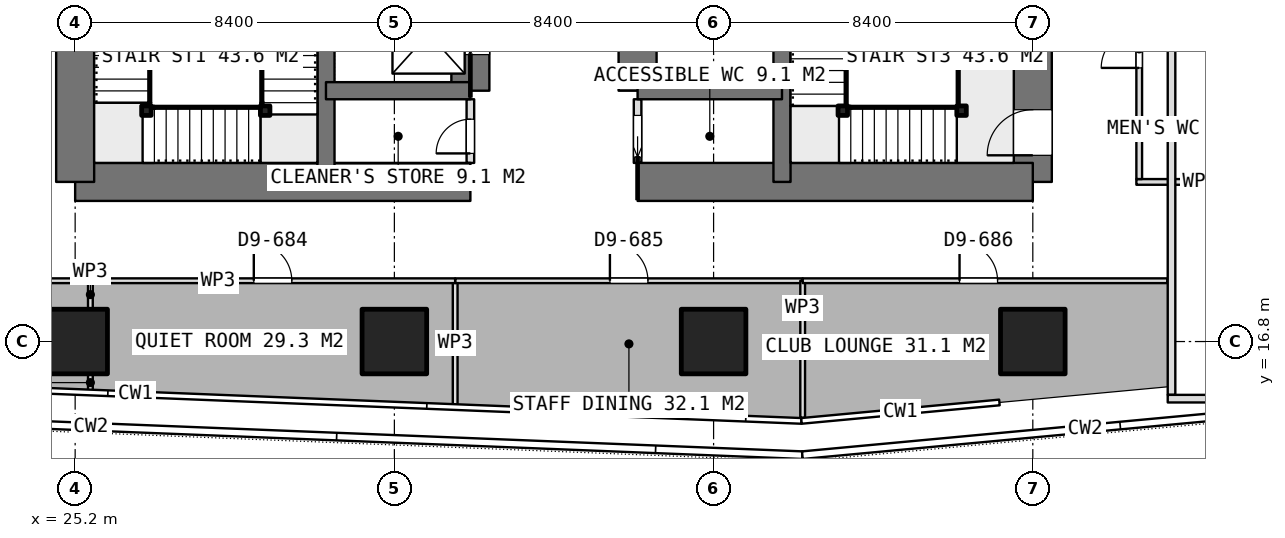
"""IFC4 building model, lengths in metres.
Left out: names, types, materials, properties, quantities, classifications, styles, units other than length and angle.
Written with IfcOpenShell. Run it as: python <this file> out.ifc"""

import sys

from ifc_helpers import new_model, si_unit, direction, frame, frame_2d, origin, origin_2d, place, context, subcontext, project, spatial, rectangle, extrude, element, fill, save


model = new_model("IFC4")
c1 = context("Model", 3, precision=1e-05, world=origin(), true_north=direction((0.0, 1.0)))
c2 = subcontext(c1, "Body", "Model", "MODEL_VIEW")
j1 = project(units=[si_unit("LENGTHUNIT", "METRE"), si_unit("PLANEANGLEUNIT", "RADIAN")], contexts=[c1])
p1 = place(None, origin())
s1 = spatial("IfcSite", under=j1, at=p1, CompositionType="ELEMENT")
p2 = place(p1, origin())
s2 = spatial("IfcBuilding", under=s1, at=p2, CompositionType="ELEMENT")
p3 = place(p2, frame((0.0, 0.0, 176.45)))
s3 = spatial("IfcBuildingStorey", under=s2, at=p3, CompositionType="ELEMENT", Elevation=176.45)
p4 = place(p3, frame((25.2, 21.0, 0.0), z_axis=(0.0, 0.0, 1.0), x_axis=(1.0, 0.0, 0.0)))
e1 = element("IfcWall", 1, at=p4, inside=s3, PredefinedType="SHEAR", context=c2, shape_type="SweptSolid", body=[
    extrude(rectangle(XDim=10.4, YDim=1.0, at=frame_2d((5.2, 0.0))), origin(), (0.0, 0.0, 1.0), 3.75),
])
p5 = place(p3, frame((40.0, 21.0, 0.0), z_axis=(0.0, 0.0, 1.0), x_axis=(1.0, 0.0, 0.0)))
e2 = element("IfcWall", 2, at=p5, inside=s3, PredefinedType="SHEAR", context=c2, shape_type="SweptSolid", body=[
    extrude(rectangle(XDim=10.4, YDim=1.0, at=frame_2d((5.2, 0.0))), origin(), (0.0, 0.0, 1.0), 3.75),
])
p6 = place(p3, frame((25.2, 21.0, 0.0), z_axis=(0.0, 0.0, 1.0), x_axis=(0.0, 1.0, 0.0)))
e3 = element("IfcWall", 3, at=p6, inside=s3, PredefinedType="SHEAR", context=c2, shape_type="SweptSolid", body=[
    extrude(rectangle(XDim=25.2, YDim=1.0, at=frame_2d((12.6, 0.0))), origin(), (0.0, 0.0, 1.0), 3.75),
])
p7 = place(p6, frame((7.8, 0.0, 0.0)))
e4 = element("IfcOpeningElement", 4, at=p7, cuts=e3, PredefinedType="OPENING", context=c2, shape_type="SweptSolid", body=[
    extrude(rectangle(XDim=1.2, YDim=2.1, at=frame_2d((0.6, 1.05))), frame((0.0, 0.51, 0.0), z_axis=(0.0, -1.0, 0.0), x_axis=(1.0, 0.0, 0.0)), (0.0, 0.0, 1.0), 1.02),
])
p8 = place(p6, frame((14.25, 0.0, 0.0)))
e5 = element("IfcOpeningElement", 5, at=p8, cuts=e3, PredefinedType="OPENING", context=c2, shape_type="SweptSolid", body=[
    extrude(rectangle(XDim=0.9, YDim=2.1, at=frame_2d((0.45, 1.05))), frame((0.0, 0.51, 0.0), z_axis=(0.0, -1.0, 0.0), x_axis=(1.0, 0.0, 0.0)), (0.0, 0.0, 1.0), 1.02),
])
p9 = place(p6, frame((16.85, 0.0, 0.0)))
e6 = element("IfcOpeningElement", 6, at=p9, cuts=e3, PredefinedType="OPENING", context=c2, shape_type="SweptSolid", body=[
    extrude(rectangle(XDim=0.9, YDim=2.1, at=frame_2d((0.45, 1.05))), frame((0.0, 0.51, 0.0), z_axis=(0.0, -1.0, 0.0), x_axis=(1.0, 0.0, 0.0)), (0.0, 0.0, 1.0), 1.02),
])
p10 = place(p6, frame((19.025, 0.0, 0.0)))
e7 = element("IfcOpeningElement", 7, at=p10, cuts=e3, PredefinedType="OPENING", context=c2, shape_type="SweptSolid", body=[
    extrude(rectangle(XDim=1.2, YDim=2.1, at=frame_2d((0.6, 1.05))), frame((0.0, 0.51, 0.0), z_axis=(0.0, -1.0, 0.0), x_axis=(1.0, 0.0, 0.0)), (0.0, 0.0, 1.0), 1.02),
])
p11 = place(p3, frame((50.4, 21.0, 0.0), z_axis=(0.0, 0.0, 1.0), x_axis=(0.0, 1.0, 0.0)))
e8 = element("IfcWall", 8, at=p11, inside=s3, PredefinedType="SHEAR", context=c2, shape_type="SweptSolid", body=[
    extrude(rectangle(XDim=25.2, YDim=1.0, at=frame_2d((12.6, 0.0))), origin(), (0.0, 0.0, 1.0), 3.75),
])
p12 = place(p11, frame((16.2, 0.0, 0.0)))
e9 = element("IfcOpeningElement", 9, at=p12, cuts=e8, PredefinedType="OPENING", context=c2, shape_type="SweptSolid", body=[
    extrude(rectangle(XDim=1.2, YDim=2.1, at=frame_2d((0.6, 1.05))), frame((0.0, 0.51, 0.0), z_axis=(0.0, -1.0, 0.0), x_axis=(1.0, 0.0, 0.0)), (0.0, 0.0, 1.0), 1.02),
])
p13 = place(p11, frame((10.05, 0.0, 0.0)))
e10 = element("IfcOpeningElement", 10, at=p13, cuts=e8, PredefinedType="OPENING", context=c2, shape_type="SweptSolid", body=[
    extrude(rectangle(XDim=0.9, YDim=2.1, at=frame_2d((0.45, 1.05))), frame((0.0, 0.51, 0.0), z_axis=(0.0, -1.0, 0.0), x_axis=(1.0, 0.0, 0.0)), (0.0, 0.0, 1.0), 1.02),
])
p14 = place(p11, frame((7.45, 0.0, 0.0)))
e11 = element("IfcOpeningElement", 11, at=p14, cuts=e8, PredefinedType="OPENING", context=c2, shape_type="SweptSolid", body=[
    extrude(rectangle(XDim=0.9, YDim=2.1, at=frame_2d((0.45, 1.05))), frame((0.0, 0.51, 0.0), z_axis=(0.0, -1.0, 0.0), x_axis=(1.0, 0.0, 0.0)), (0.0, 0.0, 1.0), 1.02),
])
p15 = place(p11, frame((0.7, 0.0, 0.0)))
e12 = element("IfcOpeningElement", 12, at=p15, cuts=e8, PredefinedType="OPENING", context=c2, shape_type="SweptSolid", body=[
    extrude(rectangle(XDim=1.2, YDim=2.1, at=frame_2d((0.6, 1.05))), frame((0.0, 0.51, 0.0), z_axis=(0.0, -1.0, 0.0), x_axis=(1.0, 0.0, 0.0)), (0.0, 0.0, 1.0), 1.02),
])
for number, where, z_axis, x_axis in (
    (13, (31.8, 21.0, 0.0), (0.0, 0.0, 1.0), (0.0, 1.0, 0.0)),
    (14, (43.8, 21.0, 0.0), (0.0, 0.0, 1.0), (0.0, 1.0, 0.0)),
):
    element("IfcWall", number, at=place(p3, frame(where, z_axis=z_axis, x_axis=x_axis)), inside=s3, PredefinedType="SHEAR", context=c2, shape_type="SweptSolid", body=[
        extrude(rectangle(XDim=25.2, YDim=0.45, at=frame_2d((12.6, 0.0))), origin(), (0.0, 0.0, 1.0), 3.75),
    ])
p16 = place(p3, frame((35.6, 23.4, 0.0), z_axis=(0.0, 0.0, 1.0), x_axis=(0.0, 1.0, 0.0)))
e15 = element("IfcWall", 15, at=p16, inside=s3, PredefinedType="SHEAR", context=c2, shape_type="SweptSolid", body=[
    extrude(rectangle(XDim=18.0, YDim=1.0, at=frame_2d((9.0, 0.0))), origin(), (0.0, 0.0, 1.0), 3.75),
])
p17 = place(p16, frame((0.95, 0.0, 0.0)))
e16 = element("IfcOpeningElement", 16, at=p17, cuts=e15, PredefinedType="OPENING", context=c2, shape_type="SweptSolid", body=[
    extrude(rectangle(XDim=1.1, YDim=2.1, at=frame_2d((0.55, 1.05))), frame((0.0, 0.51, 0.0), z_axis=(0.0, -1.0, 0.0), x_axis=(1.0, 0.0, 0.0)), (0.0, 0.0, 1.0), 1.02),
])
p18 = place(p16, frame((3.95, 0.0, 0.0)))
e17 = element("IfcOpeningElement", 17, at=p18, cuts=e15, PredefinedType="OPENING", context=c2, shape_type="SweptSolid", body=[
    extrude(rectangle(XDim=1.1, YDim=2.1, at=frame_2d((0.55, 1.05))), frame((0.0, 0.51, 0.0), z_axis=(0.0, -1.0, 0.0), x_axis=(1.0, 0.0, 0.0)), (0.0, 0.0, 1.0), 1.02),
])
p19 = place(p16, frame((6.95, 0.0, 0.0)))
e18 = element("IfcOpeningElement", 18, at=p19, cuts=e15, PredefinedType="OPENING", context=c2, shape_type="SweptSolid", body=[
    extrude(rectangle(XDim=1.1, YDim=2.1, at=frame_2d((0.55, 1.05))), frame((0.0, 0.51, 0.0), z_axis=(0.0, -1.0, 0.0), x_axis=(1.0, 0.0, 0.0)), (0.0, 0.0, 1.0), 1.02),
])
p20 = place(p16, frame((9.95, 0.0, 0.0)))
e19 = element("IfcOpeningElement", 19, at=p20, cuts=e15, PredefinedType="OPENING", context=c2, shape_type="SweptSolid", body=[
    extrude(rectangle(XDim=1.1, YDim=2.1, at=frame_2d((0.55, 1.05))), frame((0.0, 0.51, 0.0), z_axis=(0.0, -1.0, 0.0), x_axis=(1.0, 0.0, 0.0)), (0.0, 0.0, 1.0), 1.02),
])
p21 = place(p16, frame((12.95, 0.0, 0.0)))
e20 = element("IfcOpeningElement", 20, at=p21, cuts=e15, PredefinedType="OPENING", context=c2, shape_type="SweptSolid", body=[
    extrude(rectangle(XDim=1.1, YDim=2.1, at=frame_2d((0.55, 1.05))), frame((0.0, 0.51, 0.0), z_axis=(0.0, -1.0, 0.0), x_axis=(1.0, 0.0, 0.0)), (0.0, 0.0, 1.0), 1.02),
])
p22 = place(p16, frame((15.95, 0.0, 0.0)))
e21 = element("IfcOpeningElement", 21, at=p22, cuts=e15, PredefinedType="OPENING", context=c2, shape_type="SweptSolid", body=[
    extrude(rectangle(XDim=1.1, YDim=2.1, at=frame_2d((0.55, 1.05))), frame((0.0, 0.51, 0.0), z_axis=(0.0, -1.0, 0.0), x_axis=(1.0, 0.0, 0.0)), (0.0, 0.0, 1.0), 1.02),
])
p23 = place(p3, frame((40.0, 23.4, 0.0), z_axis=(0.0, 0.0, 1.0), x_axis=(0.0, 1.0, 0.0)))
e22 = element("IfcWall", 22, at=p23, inside=s3, PredefinedType="SHEAR", context=c2, shape_type="SweptSolid", body=[
    extrude(rectangle(XDim=18.0, YDim=1.0, at=frame_2d((9.0, 0.0))), origin(), (0.0, 0.0, 1.0), 3.75),
])
p24 = place(p23, frame((3.15, 0.0, 0.0)))
e23 = element("IfcOpeningElement", 23, at=p24, cuts=e22, PredefinedType="OPENING", context=c2, shape_type="SweptSolid", body=[
    extrude(rectangle(XDim=0.9, YDim=2.1, at=frame_2d((0.45, 1.05))), frame((0.0, 0.51, 0.0), z_axis=(0.0, -1.0, 0.0), x_axis=(1.0, 0.0, 0.0)), (0.0, 0.0, 1.0), 1.02),
])
p25 = place(p23, frame((9.1, 0.0, 0.0)))
e24 = element("IfcOpeningElement", 24, at=p25, cuts=e22, PredefinedType="OPENING", context=c2, shape_type="SweptSolid", body=[
    extrude(rectangle(XDim=1.0, YDim=2.1, at=frame_2d((0.5, 1.05))), frame((0.0, 0.51, 0.0), z_axis=(0.0, -1.0, 0.0), x_axis=(1.0, 0.0, 0.0)), (0.0, 0.0, 1.0), 1.02),
])
for number, where, z_axis, x_axis in (
    (25, (31.8, 23.4, 0.0), (0.0, 0.0, 1.0), (1.0, 0.0, 0.0)),
    (26, (40.0, 23.4, 0.0), (0.0, 0.0, 1.0), (1.0, 0.0, 0.0)),
):
    element("IfcWall", number, at=place(p3, frame(where, z_axis=z_axis, x_axis=x_axis)), inside=s3, PredefinedType="SHEAR", context=c2, shape_type="SweptSolid", body=[
        extrude(rectangle(XDim=3.8, YDim=0.45, at=frame_2d((1.9, 0.0))), origin(), (0.0, 0.0, 1.0), 3.75),
    ])
for number, where, z_axis, x_axis in (
    (27, (25.2, 16.8, 0.0), (0.0, 0.0, 1.0), (1.0, 0.0, 0.0)),
    (28, (33.6, 16.8, 0.0), (0.0, 0.0, 1.0), (1.0, 0.0, 0.0)),
    (29, (42.0, 16.8, 0.0), (0.0, 0.0, 1.0), (1.0, 0.0, 0.0)),
    (30, (50.4, 16.8, 0.0), (0.0, 0.0, 1.0), (1.0, 0.0, 0.0)),
):
    element("IfcColumn", number, at=place(p3, frame(where, z_axis=z_axis, x_axis=x_axis)), inside=s3, PredefinedType="COLUMN", context=c2, shape_type="SweptSolid", body=[
        extrude(rectangle(XDim=1.7, YDim=1.7, at=origin_2d()), origin(), (0.0, 0.0, 1.0), 3.75),
    ])
p26 = place(p3, frame((40.0, 21.5, 0.0), z_axis=(0.0, 0.0, 1.0), x_axis=(0.0, 1.0, 0.0)))
e31 = element("IfcWall", 31, at=p26, inside=s3, PredefinedType="PARTITIONING", context=c2, shape_type="SweptSolid", body=[
    extrude(rectangle(XDim=1.675, YDim=0.2, at=frame_2d((0.837, 0.0))), origin(), (0.0, 0.0, 1.0), 3.5),
])
p27 = place(p26, frame((0.15, 0.0, 0.0)))
e32 = element("IfcOpeningElement", 32, at=p27, cuts=e31, PredefinedType="OPENING", context=c2, shape_type="SweptSolid", body=[
    extrude(rectangle(XDim=1.1, YDim=2.1, at=frame_2d((0.55, 1.05))), frame((0.0, 0.11, 0.0), z_axis=(0.0, -1.0, 0.0), x_axis=(1.0, 0.0, 0.0)), (0.0, 0.0, 1.0), 0.22),
])
p28 = place(p3, frame((35.6, 21.5, 0.0), z_axis=(0.0, 0.0, 1.0), x_axis=(0.0, 1.0, 0.0)))
e33 = element("IfcWall", 33, at=p28, inside=s3, PredefinedType="PARTITIONING", context=c2, shape_type="SweptSolid", body=[
    extrude(rectangle(XDim=1.675, YDim=0.2, at=frame_2d((0.837, 0.0))), origin(), (0.0, 0.0, 1.0), 3.5),
])
p29 = place(p28, frame((0.25, 0.0, 0.0)))
e34 = element("IfcOpeningElement", 34, at=p29, cuts=e33, PredefinedType="OPENING", context=c2, shape_type="SweptSolid", body=[
    extrude(rectangle(XDim=0.9, YDim=2.1, at=frame_2d((0.45, 1.05))), frame((0.0, 0.11, 0.0), z_axis=(0.0, -1.0, 0.0), x_axis=(1.0, 0.0, 0.0)), (0.0, 0.0, 1.0), 0.22),
])
p30 = place(p3, frame((53.125, 21.0, 0.0), z_axis=(0.0, 0.0, 1.0), x_axis=(1.0, 0.0, 0.0)))
e35 = element("IfcWall", 35, at=p30, inside=s3, PredefinedType="PARTITIONING", context=c2, shape_type="SweptSolid", body=[
    extrude(rectangle(XDim=3.35, YDim=0.15, at=frame_2d((1.675, 0.0))), origin(), (0.0, 0.0, 1.0), 3.5),
])
p31 = place(p3, frame((53.2, 21.075, 0.0), z_axis=(0.0, 0.0, 1.0), x_axis=(0.0, 1.0, 0.0)))
e36 = element("IfcWall", 36, at=p31, inside=s3, PredefinedType="PARTITIONING", context=c2, shape_type="SweptSolid", body=[
    extrude(rectangle(XDim=6.85, YDim=0.15, at=frame_2d((3.425, 0.0))), origin(), (0.0, 0.0, 1.0), 3.5),
])
p32 = place(p31, frame((2.925, 0.0, 0.0)))
e37 = element("IfcOpeningElement", 37, at=p32, cuts=e36, PredefinedType="OPENING", context=c2, shape_type="SweptSolid", body=[
    extrude(rectangle(XDim=1.0, YDim=2.1, at=frame_2d((0.5, 1.05))), frame((0.0, 0.085, 0.0), z_axis=(0.0, -1.0, 0.0), x_axis=(1.0, 0.0, 0.0)), (0.0, 0.0, 1.0), 0.17),
])
p33 = place(p3, frame((35.2, 15.126, 0.0), z_axis=(0.0, 0.0, 1.0), x_axis=(0.0, 1.0, 0.0)))
e38 = element("IfcWall", 38, at=p33, inside=s3, PredefinedType="PARTITIONING", context=c2, shape_type="SweptSolid", body=[
    extrude(rectangle(XDim=3.274, YDim=0.125, at=frame_2d((1.637, 0.0))), origin(), (0.0, 0.0, 1.0), 3.5),
])
p34 = place(p3, frame((35.2, 18.4, 0.0), z_axis=(0.0, 0.0, 1.0), x_axis=(1.0, 0.0, 0.0)))
e39 = element("IfcWall", 39, at=p34, inside=s3, PredefinedType="PARTITIONING", context=c2, shape_type="SweptSolid", body=[
    extrude(rectangle(XDim=9.144, YDim=0.125, at=frame_2d((4.572, 0.0))), origin(), (0.0, 0.0, 1.0), 3.5),
])
p35 = place(p34, frame((4.072, 0.0, 0.0)))
e40 = element("IfcOpeningElement", 40, at=p35, cuts=e39, PredefinedType="OPENING", context=c2, shape_type="SweptSolid", body=[
    extrude(rectangle(XDim=1.0, YDim=2.1, at=frame_2d((0.5, 1.05))), frame((0.0, 0.073, 0.0), z_axis=(0.0, -1.0, 0.0), x_axis=(1.0, 0.0, 0.0)), (0.0, 0.0, 1.0), 0.145),
])
p36 = place(p3, frame((44.344, 18.4, 0.0), z_axis=(0.0, 0.0, 1.0), x_axis=(0.0, -1.0, 0.0)))
e41 = element("IfcWall", 41, at=p36, inside=s3, PredefinedType="PARTITIONING", context=c2, shape_type="SweptSolid", body=[
    extrude(rectangle(XDim=3.605, YDim=0.125, at=frame_2d((1.802, 0.0))), origin(), (0.0, 0.0, 1.0), 3.5),
])
p37 = place(p3, frame((44.345, 18.4, 0.0), z_axis=(0.0, 0.0, 1.0), x_axis=(1.0, 0.0, 0.0)))
e42 = element("IfcWall", 42, at=p37, inside=s3, PredefinedType="PARTITIONING", context=c2, shape_type="SweptSolid", body=[
    extrude(rectangle(XDim=9.594, YDim=0.125, at=frame_2d((4.797, 0.0))), origin(), (0.0, 0.0, 1.0), 3.5),
])
p38 = place(p37, frame((4.127, 0.0, 0.0)))
e43 = element("IfcOpeningElement", 43, at=p38, cuts=e42, PredefinedType="OPENING", context=c2, shape_type="SweptSolid", body=[
    extrude(rectangle(XDim=1.0, YDim=2.1, at=frame_2d((0.5, 1.05))), frame((0.0, 0.073, 0.0), z_axis=(0.0, -1.0, 0.0), x_axis=(1.0, 0.0, 0.0)), (0.0, 0.0, 1.0), 0.145),
])
p39 = place(p3, frame((25.601, 18.4, 0.0), z_axis=(0.0, 0.0, 1.0), x_axis=(0.0, -1.0, 0.0)))
e44 = element("IfcWall", 44, at=p39, inside=s3, PredefinedType="PARTITIONING", context=c2, shape_type="SweptSolid", body=[
    extrude(rectangle(XDim=0.73, YDim=0.125, at=frame_2d((0.365, 0.0))), origin(), (0.0, 0.0, 1.0), 3.5),
])
p40 = place(p3, frame((25.601, 15.93, 0.0), z_axis=(0.0, 0.0, 1.0), x_axis=(0.0, -1.0, 0.0)))
e45 = element("IfcWall", 45, at=p40, inside=s3, PredefinedType="PARTITIONING", context=c2, shape_type="SweptSolid", body=[
    extrude(rectangle(XDim=0.421, YDim=0.125, at=frame_2d((0.21, 0.0))), origin(), (0.0, 0.0, 1.0), 3.5),
])
p41 = place(p3, frame((19.2, 18.4, 0.0), z_axis=(0.0, 0.0, 1.0), x_axis=(1.0, 0.0, 0.0)))
e46 = element("IfcWall", 46, at=p41, inside=s3, PredefinedType="PARTITIONING", context=c2, shape_type="SweptSolid", body=[
    extrude(rectangle(XDim=6.401, YDim=0.125, at=frame_2d((3.201, 0.0))), origin(), (0.0, 0.0, 1.0), 3.5),
])
p42 = place(p41, frame((2.701, 0.0, 0.0)))
e47 = element("IfcOpeningElement", 47, at=p42, cuts=e46, PredefinedType="OPENING", context=c2, shape_type="SweptSolid", body=[
    extrude(rectangle(XDim=1.0, YDim=2.1, at=frame_2d((0.5, 1.05))), frame((0.0, 0.073, 0.0), z_axis=(0.0, -1.0, 0.0), x_axis=(1.0, 0.0, 0.0)), (0.0, 0.0, 1.0), 0.145),
])
p43 = place(p3, frame((25.602, 18.4, 0.0), z_axis=(0.0, 0.0, 1.0), x_axis=(1.0, 0.0, 0.0)))
e48 = element("IfcWall", 48, at=p43, inside=s3, PredefinedType="PARTITIONING", context=c2, shape_type="SweptSolid", body=[
    extrude(rectangle(XDim=9.597, YDim=0.125, at=frame_2d((4.798, 0.0))), origin(), (0.0, 0.0, 1.0), 3.5),
])
p44 = place(p43, frame((4.299, 0.0, 0.0)))
e49 = element("IfcOpeningElement", 49, at=p44, cuts=e48, PredefinedType="OPENING", context=c2, shape_type="SweptSolid", body=[
    extrude(rectangle(XDim=1.0, YDim=2.1, at=frame_2d((0.5, 1.05))), frame((0.0, 0.073, 0.0), z_axis=(0.0, -1.0, 0.0), x_axis=(1.0, 0.0, 0.0)), (0.0, 0.0, 1.0), 0.145),
])
for number, where, z_axis, x_axis in (
    (50, (30.2, 22.875, 0.0), (0.0, 0.0, 1.0), (1.0, 0.0, 0.0)),
    (51, (27.075, 22.875, 0.0), (0.0, 0.0, 1.0), (1.0, 0.0, 0.0)),
    (52, (48.525, 22.875, 0.0), (0.0, 0.0, 1.0), (1.0, 0.0, 0.0)),
    (53, (45.4, 22.875, 0.0), (0.0, 0.0, 1.0), (1.0, 0.0, 0.0)),
):
    element("IfcColumn", number, at=place(p3, frame(where, z_axis=z_axis, x_axis=x_axis)), inside=s3, PredefinedType="COLUMN", context=c2, shape_type="SweptSolid", body=[
        extrude(rectangle(XDim=0.25, YDim=0.25, at=origin_2d()), origin(), (0.0, 0.0, 1.0), 3.75),
    ])
p45 = place(p3, frame((54.05, 15.397, 0.0), z_axis=(0.0, 0.0, 1.0), x_axis=(0.0, 1.0, 0.0)))
e54 = element("IfcWall", 54, at=p45, inside=s3, PredefinedType="PARTITIONING", context=c2, shape_type="SweptSolid", body=[
    extrude(rectangle(XDim=29.031, YDim=0.2, at=frame_2d((14.516, 0.0))), origin(), (0.0, 0.0, 1.0), 3.5),
])
p46 = place(p45, frame((21.803, 0.0, 0.0)))
e55 = element("IfcOpeningElement", 55, at=p46, cuts=e54, PredefinedType="OPENING", context=c2, shape_type="SweptSolid", body=[
    extrude(rectangle(XDim=1.2, YDim=2.1, at=frame_2d((0.6, 1.05))), frame((0.0, 0.11, 0.0), z_axis=(0.0, -1.0, 0.0), x_axis=(1.0, 0.0, 0.0)), (0.0, 0.0, 1.0), 0.22),
])
p47 = place(p3, frame((53.95, 15.297, 0.0), z_axis=(0.0, 0.0, 1.0), x_axis=(1.0, 0.0, 0.0)))
e56 = element("IfcWall", 56, at=p47, inside=s3, PredefinedType="PARTITIONING", context=c2, shape_type="SweptSolid", body=[
    extrude(rectangle(XDim=6.419, YDim=0.2, at=frame_2d((3.209, 0.0))), origin(), (0.0, 0.0, 1.0), 3.5),
])
p48 = place(p27, origin())
e57 = element("IfcDoor", 57, at=p48, inside=s3, OperationType="SLIDING_TO_LEFT", PredefinedType="DOOR", context=c2, shape_type="SweptSolid", body=[
    extrude(rectangle(XDim=1.1, YDim=2.1, at=frame_2d((0.55, 1.05))), frame((0.0, 0.025, 0.0), z_axis=(0.0, -1.0, 0.0), x_axis=(1.0, 0.0, 0.0)), (0.0, 0.0, 1.0), 0.05),
])
fill(e32, e57)
p49 = place(p29, origin())
e58 = element("IfcDoor", 58, at=p49, inside=s3, OperationType="SINGLE_SWING_LEFT", PredefinedType="DOOR", context=c2, shape_type="SweptSolid", body=[
    extrude(rectangle(XDim=0.9, YDim=2.1, at=frame_2d((0.45, 1.05))), frame((0.0, 0.025, 0.0), z_axis=(0.0, -1.0, 0.0), x_axis=(1.0, 0.0, 0.0)), (0.0, 0.0, 1.0), 0.05),
])
fill(e34, e58)
p50 = place(p17, origin())
e59 = element("IfcDoor", 59, at=p50, inside=s3, OperationType="SLIDING_TO_LEFT", PredefinedType="USERDEFINED", context=c2, shape_type="SweptSolid", body=[
    extrude(rectangle(XDim=1.1, YDim=2.1, at=frame_2d((0.55, 1.05))), frame((0.0, 0.025, 0.0), z_axis=(0.0, -1.0, 0.0), x_axis=(1.0, 0.0, 0.0)), (0.0, 0.0, 1.0), 0.05),
])
fill(e16, e59)
p51 = place(p32, origin())
e60 = element("IfcDoor", 60, at=p51, inside=s3, OperationType="SINGLE_SWING_LEFT", PredefinedType="DOOR", context=c2, shape_type="SweptSolid", body=[
    extrude(rectangle(XDim=1.0, YDim=2.1, at=frame_2d((0.5, 1.05))), frame((0.0, 0.025, 0.0), z_axis=(0.0, -1.0, 0.0), x_axis=(1.0, 0.0, 0.0)), (0.0, 0.0, 1.0), 0.05),
])
fill(e37, e60)
p52 = place(p35, origin())
e61 = element("IfcDoor", 61, at=p52, inside=s3, OperationType="SINGLE_SWING_LEFT", PredefinedType="DOOR", context=c2, shape_type="SweptSolid", body=[
    extrude(rectangle(XDim=1.0, YDim=2.1, at=frame_2d((0.5, 1.05))), frame((0.0, 0.025, 0.0), z_axis=(0.0, -1.0, 0.0), x_axis=(1.0, 0.0, 0.0)), (0.0, 0.0, 1.0), 0.05),
])
fill(e40, e61)
p53 = place(p38, origin())
e62 = element("IfcDoor", 62, at=p53, inside=s3, OperationType="SINGLE_SWING_LEFT", PredefinedType="DOOR", context=c2, shape_type="SweptSolid", body=[
    extrude(rectangle(XDim=1.0, YDim=2.1, at=frame_2d((0.5, 1.05))), frame((0.0, 0.025, 0.0), z_axis=(0.0, -1.0, 0.0), x_axis=(1.0, 0.0, 0.0)), (0.0, 0.0, 1.0), 0.05),
])
fill(e43, e62)
p54 = place(p44, origin())
e63 = element("IfcDoor", 63, at=p54, inside=s3, OperationType="SINGLE_SWING_LEFT", PredefinedType="DOOR", context=c2, shape_type="SweptSolid", body=[
    extrude(rectangle(XDim=1.0, YDim=2.1, at=frame_2d((0.5, 1.05))), frame((0.0, 0.025, 0.0), z_axis=(0.0, -1.0, 0.0), x_axis=(1.0, 0.0, 0.0)), (0.0, 0.0, 1.0), 0.05),
])
fill(e49, e63)
p55 = place(p15, origin())
e64 = element("IfcDoor", 64, at=p55, inside=s3, OperationType="SINGLE_SWING_RIGHT", PredefinedType="DOOR", context=c2, shape_type="SweptSolid", body=[
    extrude(rectangle(XDim=1.2, YDim=2.1, at=frame_2d((0.6, 1.05))), frame((0.0, 0.025, 0.0), z_axis=(0.0, -1.0, 0.0), x_axis=(1.0, 0.0, 0.0)), (0.0, 0.0, 1.0), 0.05),
])
fill(e12, e64)
save(model, sys.argv[1])
